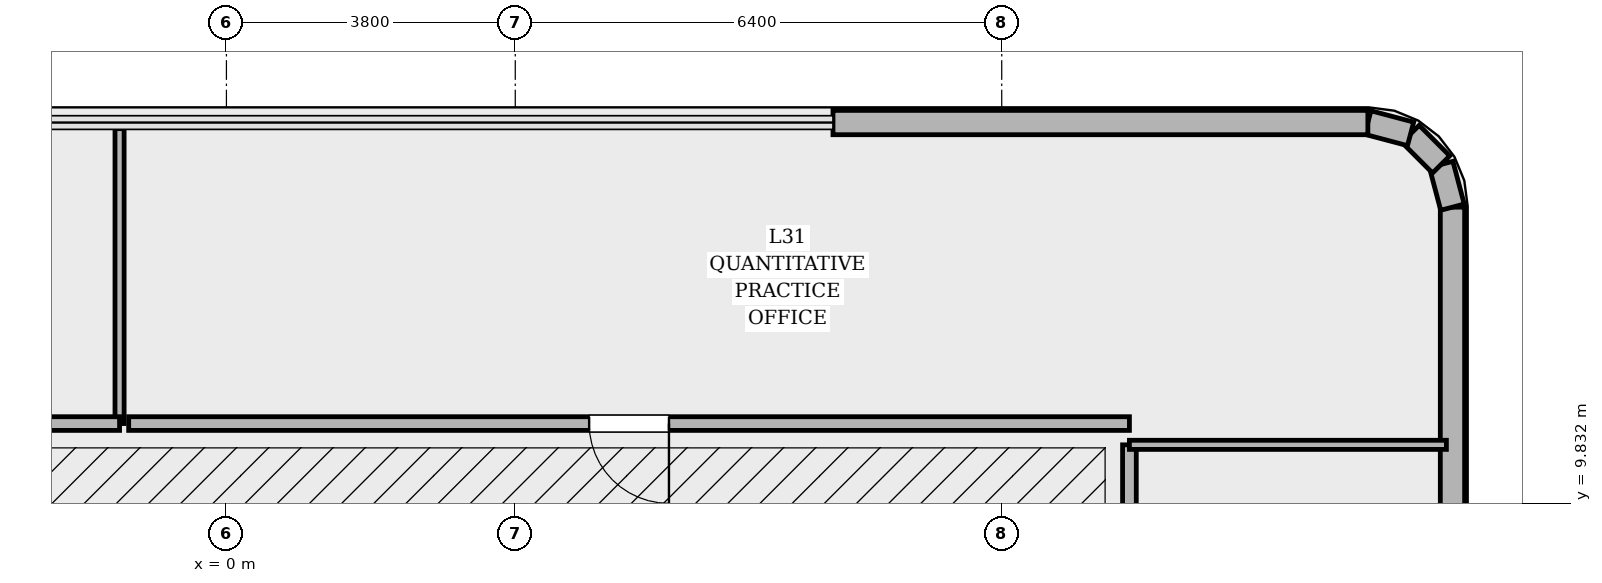
"""IFC4 building model, lengths in metres.
Left out: names, types, materials, properties, quantities, classifications, styles, units other than length and angle.
Written with IfcOpenShell. Run it as: python <this file> out.ifc"""

import sys

from ifc_helpers import new_model, si_unit, direction, frame, frame_2d, origin, place, context, subcontext, project, spatial, rectangle, extrude, element, fill, save


model = new_model("IFC4")
c1 = context("Model", 3, precision=1e-05, world=origin(), true_north=direction((0.0, 1.0)))
c2 = subcontext(c1, "Body", "Model", "MODEL_VIEW")
j1 = project(units=[si_unit("LENGTHUNIT", "METRE"), si_unit("PLANEANGLEUNIT", "RADIAN")], contexts=[c1])
p1 = place(None, origin())
s1 = spatial("IfcSite", under=j1, at=p1, CompositionType="ELEMENT")
p2 = place(p1, origin())
s2 = spatial("IfcBuilding", under=s1, at=p2, CompositionType="ELEMENT")
p3 = place(p2, frame((0.0, 0.0, 135.0)))
s3 = spatial("IfcBuildingStorey", under=s2, at=p3, CompositionType="ELEMENT", Elevation=135.0)
p4 = place(p3, frame((16.13, 6.69, 0.0), z_axis=(0.0, 0.0, 1.0), x_axis=(0.0, 1.0, 0.0)))
e1 = element("IfcWall", 1, at=p4, inside=s3, PredefinedType="SOLIDWALL", context=c2, shape_type="SweptSolid", body=[
    extrude(rectangle(XDim=7.037, YDim=0.32, at=frame_2d((3.519, 0.0))), origin(), (0.0, 0.0, 1.0), 3.194),
])
p5 = place(p3, frame((16.13, 13.727, 0.0), z_axis=(0.0, 0.0, 1.0), x_axis=(-0.255650250031, 0.966769336325, 0.0)))
e2 = element("IfcWall", 2, at=p5, inside=s3, PredefinedType="SOLIDWALL", context=c2, shape_type="SweptSolid", body=[
    extrude(rectangle(XDim=0.582, YDim=0.32, at=frame_2d((0.291, 0.0))), origin(), (0.0, 0.0, 1.0), 4.52),
])
p6 = place(p3, frame((15.981, 14.289, 0.0), z_axis=(0.0, 0.0, 1.0), x_axis=(-0.707106781187, 0.707106781187, 0.0)))
e3 = element("IfcWall", 3, at=p6, inside=s3, PredefinedType="SOLIDWALL", context=c2, shape_type="SweptSolid", body=[
    extrude(rectangle(XDim=0.569, YDim=0.32, at=frame_2d((0.284, 0.0))), origin(), (0.0, 0.0, 1.0), 4.52),
])
p7 = place(p3, frame((15.579, 14.691, 0.0), z_axis=(0.0, 0.0, 1.0), x_axis=(-0.966665515501, 0.256042537758, 0.0)))
e4 = element("IfcWall", 4, at=p7, inside=s3, PredefinedType="SOLIDWALL", context=c2, shape_type="SweptSolid", body=[
    extrude(rectangle(XDim=0.582, YDim=0.32, at=frame_2d((0.291, 0.0))), origin(), (0.0, 0.0, 1.0), 4.52),
])
p8 = place(p3, frame((15.017, 14.84, 0.0), z_axis=(0.0, 0.0, 1.0), x_axis=(-1.0, 0.0, 0.0)))
e5 = element("IfcWall", 5, at=p8, inside=s3, PredefinedType="SOLIDWALL", context=c2, shape_type="SweptSolid", body=[
    extrude(rectangle(XDim=7.037, YDim=0.32, at=frame_2d((3.519, 0.0))), origin(), (0.0, 0.0, 1.0), 3.194),
])
p9 = place(p3, frame((11.88, 0.06, 0.0), z_axis=(0.0, 0.0, 1.0), x_axis=(0.0, 1.0, 0.0)))
e6 = element("IfcWall", 6, at=p9, inside=s3, PredefinedType="PARTITIONING", context=c2, shape_type="SweptSolid", body=[
    extrude(rectangle(XDim=10.54, YDim=0.18, at=frame_2d((5.27, 0.0))), origin(), (0.0, 0.0, 1.0), 3.194),
])
p10 = place(p9, frame((4.745, 0.0, 0.0)))
e7 = element("IfcOpeningElement", 7, at=p10, cuts=e6, PredefinedType="OPENING", context=c2, shape_type="SweptSolid", body=[
    extrude(rectangle(XDim=1.05, YDim=2.2, at=frame_2d((0.525, 1.1))), frame((0.0, 0.1, 0.0), z_axis=(0.0, -1.0, 0.0), x_axis=(1.0, 0.0, 0.0)), (0.0, 0.0, 1.0), 0.2),
])
p11 = place(p3, frame((11.88, 10.6, 0.0), z_axis=(0.0, 0.0, 1.0), x_axis=(1.0, 0.0, 0.0)))
e8 = element("IfcWall", 8, at=p11, inside=s3, PredefinedType="PARTITIONING", context=c2, shape_type="SweptSolid", body=[
    extrude(rectangle(XDim=4.17, YDim=0.12, at=frame_2d((2.085, 0.0))), origin(), (0.0, 0.0, 1.0), 4.114),
])
p12 = place(p3, frame((-1.406, 14.76, 0.0), z_axis=(0.0, 0.0, 1.0), x_axis=(0.0, -1.0, 0.0)))
e9 = element("IfcWall", 9, at=p12, inside=s3, PredefinedType="PARTITIONING", context=c2, shape_type="SweptSolid", body=[
    extrude(rectangle(XDim=3.88, YDim=0.12, at=frame_2d((1.94, 0.0))), origin(), (0.0, 0.0, 1.0), 4.52),
])
p13 = place(p3, frame((-1.406, 10.88, 0.0), z_axis=(0.0, 0.0, 1.0), x_axis=(-1.0, 0.0, 0.0)))
e10 = element("IfcWall", 10, at=p13, inside=s3, PredefinedType="PARTITIONING", context=c2, shape_type="SweptSolid", body=[
    extrude(rectangle(XDim=10.474, YDim=0.18, at=frame_2d((5.237, 0.0))), origin(), (0.0, 0.0, 1.0), 3.194),
])
p14 = place(p13, frame((4.712, 0.0, 0.0)))
e11 = element("IfcOpeningElement", 11, at=p14, cuts=e10, PredefinedType="OPENING", context=c2, shape_type="SweptSolid", body=[
    extrude(rectangle(XDim=1.05, YDim=2.2, at=frame_2d((0.525, 1.1))), frame((0.0, 0.1, 0.0), z_axis=(0.0, -1.0, 0.0), x_axis=(1.0, 0.0, 0.0)), (0.0, 0.0, 1.0), 0.2),
])
p15 = place(p3, frame((11.88, 10.88, 0.0), z_axis=(0.0, 0.0, 1.0), x_axis=(-1.0, 0.0, 0.0)))
e12 = element("IfcWall", 12, at=p15, inside=s3, PredefinedType="PARTITIONING", context=c2, shape_type="SweptSolid", body=[
    extrude(rectangle(XDim=13.166, YDim=0.18, at=frame_2d((6.583, 0.0))), origin(), (0.0, 0.0, 1.0), 3.194),
])
p16 = place(p15, frame((6.058, 0.0, 0.0)))
e13 = element("IfcOpeningElement", 13, at=p16, cuts=e12, PredefinedType="OPENING", context=c2, shape_type="SweptSolid", body=[
    extrude(rectangle(XDim=1.05, YDim=2.2, at=frame_2d((0.525, 1.1))), frame((0.0, 0.1, 0.0), z_axis=(0.0, -1.0, 0.0), x_axis=(1.0, 0.0, 0.0)), (0.0, 0.0, 1.0), 0.2),
])
p17 = place(p16, origin())
e14 = element("IfcDoor", 14, at=p17, inside=s3, OperationType="SINGLE_SWING_LEFT", PredefinedType="DOOR", context=c2, shape_type="SweptSolid", body=[
    extrude(rectangle(XDim=1.05, YDim=2.2, at=frame_2d((0.525, 1.1))), frame((0.0, 0.025, 0.0), z_axis=(0.0, -1.0, 0.0), x_axis=(1.0, 0.0, 0.0)), (0.0, 0.0, 1.0), 0.05),
])
fill(e13, e14)
save(model, sys.argv[1])
